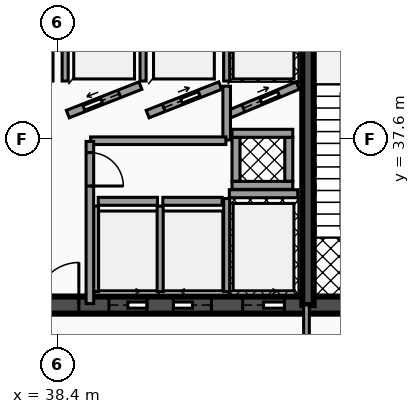
"""IFC4 building model, lengths in metres.
Left out: names, types, materials, properties, quantities, classifications, styles, units other than length and angle.
Written with IfcOpenShell. Run it as: python <this file> out.ifc"""

import sys

from ifc_helpers import new_model, si_unit, direction, frame, frame_2d, origin, place, context, subcontext, project, spatial, rectangle, extrude, element, fill, save


model = new_model("IFC4")
c1 = context("Model", 3, precision=1e-05, world=origin(), true_north=direction((0.0, 1.0)))
c2 = subcontext(c1, "Body", "Model", "MODEL_VIEW")
j1 = project(units=[si_unit("LENGTHUNIT", "METRE"), si_unit("PLANEANGLEUNIT", "RADIAN")], contexts=[c1])
p1 = place(None, origin())
s1 = spatial("IfcSite", under=j1, at=p1, CompositionType="ELEMENT")
p2 = place(p1, origin())
s2 = spatial("IfcBuilding", under=s1, at=p2, CompositionType="ELEMENT")
p3 = place(p2, origin())
s3 = spatial("IfcBuildingStorey", under=s2, at=p3, CompositionType="ELEMENT", Elevation=0.0)
p4 = place(p3, frame((28.4, 33.225, 0.0), z_axis=(0.0, 0.0, 1.0), x_axis=(1.0, 0.0, 0.0)))
e1 = element("IfcWall", 1, at=p4, inside=s3, PredefinedType="SHEAR", context=c2, shape_type="SweptSolid", body=[
    extrude(rectangle(XDim=20.11, YDim=0.45, at=frame_2d((10.055, 0.0))), origin(), (0.0, 0.0, 1.0), 4.82),
])
p5 = place(p4, frame((4.03, 0.0, 0.0)))
e2 = element("IfcOpeningElement", 2, at=p5, cuts=e1, PredefinedType="OPENING", context=c2, shape_type="SweptSolid", body=[
    extrude(rectangle(XDim=1.1, YDim=2.15, at=frame_2d((0.55, 1.075))), frame((0.0, 0.235, 0.0), z_axis=(0.0, -1.0, 0.0), x_axis=(1.0, 0.0, 0.0)), (0.0, 0.0, 1.0), 0.47),
])
p6 = place(p4, frame((14.87, 0.0, 0.0)))
e3 = element("IfcOpeningElement", 3, at=p6, cuts=e1, PredefinedType="OPENING", context=c2, shape_type="SweptSolid", body=[
    extrude(rectangle(XDim=1.1, YDim=2.15, at=frame_2d((0.55, 1.075))), frame((0.0, 0.235, 0.0), z_axis=(0.0, -1.0, 0.0), x_axis=(1.0, 0.0, 0.0)), (0.0, 0.0, 1.0), 0.47),
])
p7 = place(p4, frame((5.95, 0.0, 0.0)))
e4 = element("IfcOpeningElement", 4, at=p7, cuts=e1, PredefinedType="OPENING", context=c2, shape_type="SweptSolid", body=[
    extrude(rectangle(XDim=1.0, YDim=2.1, at=frame_2d((0.5, 1.05))), frame((0.0, 0.235, 0.0), z_axis=(0.0, -1.0, 0.0), x_axis=(1.0, 0.0, 0.0)), (0.0, 0.0, 1.0), 0.47),
])
p8 = place(p4, frame((7.65, 0.0, 0.0)))
e5 = element("IfcOpeningElement", 5, at=p8, cuts=e1, PredefinedType="OPENING", context=c2, shape_type="SweptSolid", body=[
    extrude(rectangle(XDim=1.0, YDim=2.1, at=frame_2d((0.5, 1.05))), frame((0.0, 0.235, 0.0), z_axis=(0.0, -1.0, 0.0), x_axis=(1.0, 0.0, 0.0)), (0.0, 0.0, 1.0), 0.47),
])
p9 = place(p4, frame((11.35, 0.0, 0.0)))
e6 = element("IfcOpeningElement", 6, at=p9, cuts=e1, PredefinedType="OPENING", context=c2, shape_type="SweptSolid", body=[
    extrude(rectangle(XDim=1.0, YDim=2.1, at=frame_2d((0.5, 1.05))), frame((0.0, 0.235, 0.0), z_axis=(0.0, -1.0, 0.0), x_axis=(1.0, 0.0, 0.0)), (0.0, 0.0, 1.0), 0.47),
])
p10 = place(p4, frame((13.05, 0.0, 0.0)))
e7 = element("IfcOpeningElement", 7, at=p10, cuts=e1, PredefinedType="OPENING", context=c2, shape_type="SweptSolid", body=[
    extrude(rectangle(XDim=1.0, YDim=2.1, at=frame_2d((0.5, 1.05))), frame((0.0, 0.235, 0.0), z_axis=(0.0, -1.0, 0.0), x_axis=(1.0, 0.0, 0.0)), (0.0, 0.0, 1.0), 0.47),
])
p11 = place(p4, frame((1.31, 0.0, 0.0)))
e8 = element("IfcOpeningElement", 8, at=p11, cuts=e1, PredefinedType="OPENING", context=c2, shape_type="SweptSolid", body=[
    extrude(rectangle(XDim=1.1, YDim=2.2, at=frame_2d((0.55, 1.1))), frame((0.0, 0.235, 0.0), z_axis=(0.0, -1.0, 0.0), x_axis=(1.0, 0.0, 0.0)), (0.0, 0.0, 1.0), 0.47),
])
p12 = place(p4, frame((9.44, 0.0, 0.0)))
e9 = element("IfcOpeningElement", 9, at=p12, cuts=e1, PredefinedType="OPENING", context=c2, shape_type="SweptSolid", body=[
    extrude(rectangle(XDim=1.12, YDim=2.05, at=frame_2d((0.56, 1.025))), frame((0.0, 0.235, 0.0), z_axis=(0.0, -1.0, 0.0), x_axis=(1.0, 0.0, 0.0)), (0.0, 0.0, 1.0), 0.47),
])
p13 = place(p4, frame((17.65, 0.0, 0.0)))
e10 = element("IfcOpeningElement", 10, at=p13, cuts=e1, PredefinedType="OPENING", context=c2, shape_type="SweptSolid", body=[
    extrude(rectangle(XDim=1.1, YDim=2.2, at=frame_2d((0.55, 1.1))), frame((0.0, 0.235, 0.0), z_axis=(0.0, -1.0, 0.0), x_axis=(1.0, 0.0, 0.0)), (0.0, 0.0, 1.0), 0.47),
])
p14 = place(p3, frame((44.99, 33.225, 0.0), z_axis=(0.0, 0.0, 1.0), x_axis=(0.0, 1.0, 0.0)))
e11 = element("IfcWall", 11, at=p14, inside=s3, PredefinedType="SHEAR", context=c2, shape_type="SweptSolid", body=[
    extrude(rectangle(XDim=10.25, YDim=0.3, at=frame_2d((5.125, 0.0))), origin(), (0.0, 0.0, 1.0), 4.82),
])
p15 = place(p3, frame((42.92, 36.155, 0.0), z_axis=(0.0, 0.0, 1.0), x_axis=(1.0, 0.0, 0.0)))
e12 = element("IfcWall", 12, at=p15, inside=s3, PredefinedType="SOLIDWALL", context=c2, shape_type="SweptSolid", body=[
    extrude(rectangle(XDim=1.8, YDim=0.21, at=frame_2d((0.9, 0.0))), origin(), (0.0, 0.0, 1.0), 3.792),
])
p16 = place(p3, frame((42.85, 33.58, 0.0), z_axis=(0.0, 0.0, 1.0), x_axis=(0.0, 1.0, 0.0)))
e13 = element("IfcWall", 13, at=p16, inside=s3, PredefinedType="SOLIDWALL", context=c2, shape_type="SweptSolid", body=[
    extrude(rectangle(XDim=2.45, YDim=0.16, at=frame_2d((1.225, 0.0))), origin(), (0.0, 0.0, 1.0), 3.792),
])
p17 = place(p3, frame((42.92, 38.25, 0.0), z_axis=(0.0, 0.0, 1.0), x_axis=(0.9230806271, 0.384606494839, 0.0)))
e14 = element("IfcWall", 14, at=p17, inside=s3, PredefinedType="SOLIDWALL", context=c2, shape_type="SweptSolid", body=[
    extrude(rectangle(XDim=1.95, YDim=0.21, at=frame_2d((0.975, 0.0))), origin(), (0.0, 0.0, 1.0), 3.792),
])
p18 = place(p17, frame((0.4, 0.0, 0.0)))
e15 = element("IfcOpeningElement", 15, at=p18, cuts=e14, PredefinedType="OPENING", context=c2, shape_type="SweptSolid", body=[
    extrude(rectangle(XDim=1.0, YDim=2.1, at=frame_2d((0.5, 1.05))), frame((0.0, 0.115, 0.0), z_axis=(0.0, -1.0, 0.0), x_axis=(1.0, 0.0, 0.0)), (0.0, 0.0, 1.0), 0.23),
])
for number, where, z_axis, x_axis in (
    (16, (42.85, 39.12, 0.0), (0.0, 0.0, 1.0), (0.0, 1.0, 0.0)),
    (17, (38.2, 39.12, 0.0), (0.0, 0.0, 1.0), (0.0, 1.0, 0.0)),
):
    element("IfcWall", number, at=place(p3, frame(where, z_axis=z_axis, x_axis=x_axis)), inside=s3, PredefinedType="SOLIDWALL", context=c2, shape_type="SweptSolid", body=[
        extrude(rectangle(XDim=2.21, YDim=0.16, at=frame_2d((1.105, 0.0))), origin(), (0.0, 0.0, 1.0), 3.792),
    ])
p19 = place(p3, frame((38.67, 38.25, 0.0), z_axis=(0.0, 0.0, 1.0), x_axis=(0.930820886763, 0.3654756856, 0.0)))
e18 = element("IfcWall", 18, at=p19, inside=s3, PredefinedType="SOLIDWALL", context=c2, shape_type="SweptSolid", body=[
    extrude(rectangle(XDim=2.052, YDim=0.21, at=frame_2d((1.026, 0.0))), origin(), (0.0, 0.0, 1.0), 3.792),
])
p20 = place(p19, frame((0.455, 0.0, 0.0)))
e19 = element("IfcOpeningElement", 19, at=p20, cuts=e18, PredefinedType="OPENING", context=c2, shape_type="SweptSolid", body=[
    extrude(rectangle(XDim=1.0, YDim=2.1, at=frame_2d((0.5, 1.05))), frame((0.0, 0.115, 0.0), z_axis=(0.0, -1.0, 0.0), x_axis=(1.0, 0.0, 0.0)), (0.0, 0.0, 1.0), 0.23),
])
for number, where, z_axis, x_axis in (
    (20, (38.6, 39.12, 0.0), (0.0, 0.0, 1.0), (0.0, 1.0, 0.0)),
    (21, (40.65, 39.12, 0.0), (0.0, 0.0, 1.0), (0.0, 1.0, 0.0)),
):
    element("IfcWall", number, at=place(p3, frame(where, z_axis=z_axis, x_axis=x_axis)), inside=s3, PredefinedType="SOLIDWALL", context=c2, shape_type="SweptSolid", body=[
        extrude(rectangle(XDim=2.21, YDim=0.16, at=frame_2d((1.105, 0.0))), origin(), (0.0, 0.0, 1.0), 3.792),
    ])
p21 = place(p3, frame((40.77, 38.25, 0.0), z_axis=(0.0, 0.0, 1.0), x_axis=(0.930804993012, 0.36551616241, 0.0)))
e22 = element("IfcWall", 22, at=p21, inside=s3, PredefinedType="SOLIDWALL", context=c2, shape_type="SweptSolid", body=[
    extrude(rectangle(XDim=2.052, YDim=0.21, at=frame_2d((1.026, 0.0))), origin(), (0.0, 0.0, 1.0), 3.792),
])
p22 = place(p21, frame((0.455, 0.0, 0.0)))
e23 = element("IfcOpeningElement", 23, at=p22, cuts=e22, PredefinedType="OPENING", context=c2, shape_type="SweptSolid", body=[
    extrude(rectangle(XDim=1.0, YDim=2.1, at=frame_2d((0.5, 1.05))), frame((0.0, 0.115, 0.0), z_axis=(0.0, -1.0, 0.0), x_axis=(1.0, 0.0, 0.0)), (0.0, 0.0, 1.0), 0.23),
])
p23 = place(p3, frame((39.47, 35.955, 0.0), z_axis=(0.0, 0.0, 1.0), x_axis=(1.0, 0.0, 0.0)))
e24 = element("IfcWall", 24, at=p23, inside=s3, PredefinedType="SOLIDWALL", context=c2, shape_type="SweptSolid", body=[
    extrude(rectangle(XDim=1.56, YDim=0.21, at=frame_2d((0.78, 0.0))), origin(), (0.0, 0.0, 1.0), 3.792),
])
for number, where, z_axis, x_axis in (
    (25, (39.4, 33.58, 0.0), (0.0, 0.0, 1.0), (0.0, 1.0, 0.0)),
    (26, (41.1, 33.58, 0.0), (0.0, 0.0, 1.0), (0.0, 1.0, 0.0)),
):
    element("IfcWall", number, at=place(p3, frame(where, z_axis=z_axis, x_axis=x_axis)), inside=s3, PredefinedType="SOLIDWALL", context=c2, shape_type="SweptSolid", body=[
        extrude(rectangle(XDim=2.25, YDim=0.16, at=frame_2d((1.125, 0.0))), origin(), (0.0, 0.0, 1.0), 3.792),
    ])
p24 = place(p3, frame((41.17, 35.955, 0.0), z_axis=(0.0, 0.0, 1.0), x_axis=(1.0, 0.0, 0.0)))
e27 = element("IfcWall", 27, at=p24, inside=s3, PredefinedType="SOLIDWALL", context=c2, shape_type="SweptSolid", body=[
    extrude(rectangle(XDim=1.56, YDim=0.21, at=frame_2d((0.78, 0.0))), origin(), (0.0, 0.0, 1.0), 3.792),
])
for number, where, z_axis, x_axis in (
    (28, (42.99, 36.375, 0.0), (0.0, 0.0, 1.0), (1.0, 0.0, 0.0)),
    (29, (42.99, 37.745, 0.0), (0.0, 0.0, 1.0), (1.0, 0.0, 0.0)),
):
    element("IfcWall", number, at=place(p3, frame(where, z_axis=z_axis, x_axis=x_axis)), inside=s3, PredefinedType="SOLIDWALL", context=c2, shape_type="SweptSolid", body=[
        extrude(rectangle(XDim=1.6, YDim=0.21, at=frame_2d((0.8, 0.0))), origin(), (0.0, 0.0, 1.0), 4.82),
    ])
for number, where, z_axis, x_axis in (
    (30, (43.095, 36.485, 0.0), (0.0, 0.0, 1.0), (0.0, 1.0, 0.0)),
    (31, (44.485, 36.485, 0.0), (0.0, 0.0, 1.0), (0.0, 1.0, 0.0)),
):
    element("IfcWall", number, at=place(p3, frame(where, z_axis=z_axis, x_axis=x_axis)), inside=s3, PredefinedType="SOLIDWALL", context=c2, shape_type="SweptSolid", body=[
        extrude(rectangle(XDim=1.15, YDim=0.21, at=frame_2d((0.575, 0.0))), origin(), (0.0, 0.0, 1.0), 4.82),
    ])
p25 = place(p3, frame((42.85, 37.57, 0.0), z_axis=(0.0, 0.0, 1.0), x_axis=(0.0, 1.0, 0.0)))
e32 = element("IfcWall", 32, at=p25, inside=s3, PredefinedType="PARTITIONING", context=c2, shape_type="SweptSolid", body=[
    extrude(rectangle(XDim=1.415, YDim=0.2, at=frame_2d((0.708, 0.0))), origin(), (0.0, 0.0, 1.0), 3.777),
])
p26 = place(p3, frame((39.27, 37.55, 0.0), z_axis=(0.0, 0.0, 1.0), x_axis=(1.0, 0.0, 0.0)))
e33 = element("IfcWall", 33, at=p26, inside=s3, PredefinedType="PARTITIONING", context=c2, shape_type="SweptSolid", body=[
    extrude(rectangle(XDim=3.56, YDim=0.2, at=frame_2d((1.78, 0.0))), origin(), (0.0, 0.0, 1.0), 3.777),
])
p27 = place(p3, frame((39.25, 37.53, 0.0), z_axis=(0.0, 0.0, 1.0), x_axis=(0.0, -1.0, 0.0)))
e34 = element("IfcWall", 34, at=p27, inside=s3, PredefinedType="PARTITIONING", context=c2, shape_type="SweptSolid", body=[
    extrude(rectangle(XDim=4.265, YDim=0.2, at=frame_2d((2.133, 0.0))), origin(), (0.0, 0.0, 1.0), 3.777),
])
p28 = place(p27, frame((0.292, 0.0, 0.0)))
e35 = element("IfcOpeningElement", 35, at=p28, cuts=e34, PredefinedType="OPENING", context=c2, shape_type="SweptSolid", body=[
    extrude(rectangle(XDim=0.88, YDim=2.05, at=frame_2d((0.44, 1.025))), frame((0.0, 0.11, 0.0), z_axis=(0.0, -1.0, 0.0), x_axis=(1.0, 0.0, 0.0)), (0.0, 0.0, 1.0), 0.22),
])
p29 = place(p3, frame((44.95, 30.17, 0.0), z_axis=(0.0, 0.0, 1.0), x_axis=(0.0, 1.0, 0.0)))
e36 = element("IfcWall", 36, at=p29, inside=s3, PredefinedType="PARTITIONING", context=c2, shape_type="SweptSolid", body=[
    extrude(rectangle(XDim=3.06, YDim=0.15, at=frame_2d((1.53, 0.0))), origin(), (0.0, 0.0, 1.0), 3.777),
])
p30 = place(p6, origin())
e37 = element("IfcDoor", 37, at=p30, inside=s3, OperationType="SLIDING_TO_RIGHT", PredefinedType="DOOR", context=c2, shape_type="SweptSolid", body=[
    extrude(rectangle(XDim=1.1, YDim=2.15, at=frame_2d((0.55, 1.075))), frame((0.0, 0.025, 0.0), z_axis=(0.0, -1.0, 0.0), x_axis=(1.0, 0.0, 0.0)), (0.0, 0.0, 1.0), 0.05),
])
fill(e3, e37)
p31 = place(p18, origin())
e38 = element("IfcDoor", 38, at=p31, inside=s3, OperationType="SLIDING_TO_RIGHT", PredefinedType="DOOR", context=c2, shape_type="SweptSolid", body=[
    extrude(rectangle(XDim=1.0, YDim=2.1, at=frame_2d((0.5, 1.05))), frame((0.0, 0.025, 0.0), z_axis=(0.0, -1.0, 0.0), x_axis=(1.0, 0.0, 0.0)), (0.0, 0.0, 1.0), 0.05),
])
fill(e15, e38)
p32 = place(p20, origin())
e39 = element("IfcDoor", 39, at=p32, inside=s3, OperationType="SLIDING_TO_LEFT", PredefinedType="DOOR", context=c2, shape_type="SweptSolid", body=[
    extrude(rectangle(XDim=1.0, YDim=2.1, at=frame_2d((0.5, 1.05))), frame((0.0, 0.025, 0.0), z_axis=(0.0, -1.0, 0.0), x_axis=(1.0, 0.0, 0.0)), (0.0, 0.0, 1.0), 0.05),
])
fill(e19, e39)
p33 = place(p22, origin())
e40 = element("IfcDoor", 40, at=p33, inside=s3, OperationType="SLIDING_TO_RIGHT", PredefinedType="DOOR", context=c2, shape_type="SweptSolid", body=[
    extrude(rectangle(XDim=1.0, YDim=2.1, at=frame_2d((0.5, 1.05))), frame((0.0, 0.025, 0.0), z_axis=(0.0, -1.0, 0.0), x_axis=(1.0, 0.0, 0.0)), (0.0, 0.0, 1.0), 0.05),
])
fill(e23, e40)
p34 = place(p9, origin())
e41 = element("IfcDoor", 41, at=p34, inside=s3, OperationType="SLIDING_TO_RIGHT", PredefinedType="DOOR", context=c2, shape_type="SweptSolid", body=[
    extrude(rectangle(XDim=1.0, YDim=2.1, at=frame_2d((0.5, 1.05))), frame((0.0, 0.025, 0.0), z_axis=(0.0, -1.0, 0.0), x_axis=(1.0, 0.0, 0.0)), (0.0, 0.0, 1.0), 0.05),
])
fill(e6, e41)
p35 = place(p10, origin())
e42 = element("IfcDoor", 42, at=p35, inside=s3, OperationType="SLIDING_TO_LEFT", PredefinedType="DOOR", context=c2, shape_type="SweptSolid", body=[
    extrude(rectangle(XDim=1.0, YDim=2.1, at=frame_2d((0.5, 1.05))), frame((0.0, 0.025, 0.0), z_axis=(0.0, -1.0, 0.0), x_axis=(1.0, 0.0, 0.0)), (0.0, 0.0, 1.0), 0.05),
])
fill(e7, e42)
p36 = place(p12, origin())
e43 = element("IfcDoor", 43, at=p36, inside=s3, OperationType="SINGLE_SWING_RIGHT", PredefinedType="DOOR", context=c2, shape_type="SweptSolid", body=[
    extrude(rectangle(XDim=1.12, YDim=2.05, at=frame_2d((0.56, 1.025))), frame((0.0, 0.025, 0.0), z_axis=(0.0, -1.0, 0.0), x_axis=(1.0, 0.0, 0.0)), (0.0, 0.0, 1.0), 0.05),
])
fill(e9, e43)
p37 = place(p28, origin())
e44 = element("IfcDoor", 44, at=p37, inside=s3, OperationType="SINGLE_SWING_RIGHT", PredefinedType="DOOR", context=c2, shape_type="SweptSolid", body=[
    extrude(rectangle(XDim=0.88, YDim=2.05, at=frame_2d((0.44, 1.025))), frame((0.0, 0.025, 0.0), z_axis=(0.0, -1.0, 0.0), x_axis=(1.0, 0.0, 0.0)), (0.0, 0.0, 1.0), 0.05),
])
fill(e35, e44)
save(model, sys.argv[1])
